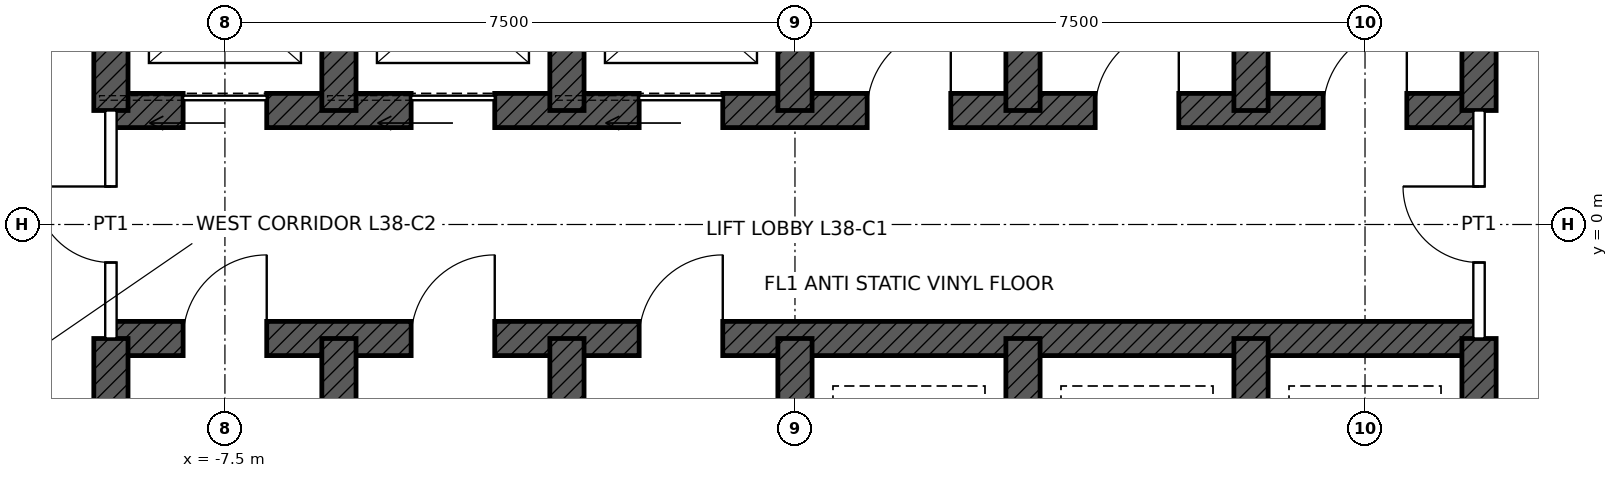
"""IFC4 building model, lengths in metres.
Left out: names, types, materials, properties, quantities, classifications, styles, units other than length and angle.
Written with IfcOpenShell. Run it as: python <this file> out.ifc"""

import sys

from ifc_helpers import new_model, si_unit, direction, frame, frame_2d, origin, place, context, subcontext, project, spatial, rectangle, extrude, element, fill, save


model = new_model("IFC4")
c1 = context("Model", 3, precision=1e-05, world=origin(), true_north=direction((0.0, 1.0)))
c2 = subcontext(c1, "Body", "Model", "MODEL_VIEW")
j1 = project(units=[si_unit("LENGTHUNIT", "METRE"), si_unit("PLANEANGLEUNIT", "RADIAN")], contexts=[c1])
p1 = place(None, origin())
s1 = spatial("IfcSite", under=j1, at=p1, CompositionType="ELEMENT")
p2 = place(p1, origin())
s2 = spatial("IfcBuilding", under=s1, at=p2, CompositionType="ELEMENT")
p3 = place(p2, frame((0.0, 0.0, 185.9)))
s3 = spatial("IfcBuildingStorey", under=s2, at=p3, CompositionType="ELEMENT", Elevation=185.9)
p4 = place(p3, frame((-9.0, 1.5, 0.0), z_axis=(0.0, 0.0, 1.0), x_axis=(1.0, 0.0, 0.0)))
e1 = element("IfcWall", 1, at=p4, inside=s3, PredefinedType="SHEAR", context=c2, shape_type="SweptSolid", body=[
    extrude(rectangle(XDim=18.0, YDim=0.45, at=frame_2d((9.0, 0.0))), origin(), (0.0, 0.0, 1.0), 4.0),
])
p5 = place(p4, frame((0.95, 0.0, 0.0)))
e2 = element("IfcOpeningElement", 2, at=p5, cuts=e1, PredefinedType="OPENING", context=c2, shape_type="SweptSolid", body=[
    extrude(rectangle(XDim=1.1, YDim=2.1, at=frame_2d((0.55, 1.05))), frame((0.0, 0.235, 0.0), z_axis=(0.0, -1.0, 0.0), x_axis=(1.0, 0.0, 0.0)), (0.0, 0.0, 1.0), 0.47),
])
p6 = place(p4, frame((3.95, 0.0, 0.0)))
e3 = element("IfcOpeningElement", 3, at=p6, cuts=e1, PredefinedType="OPENING", context=c2, shape_type="SweptSolid", body=[
    extrude(rectangle(XDim=1.1, YDim=2.1, at=frame_2d((0.55, 1.05))), frame((0.0, 0.235, 0.0), z_axis=(0.0, -1.0, 0.0), x_axis=(1.0, 0.0, 0.0)), (0.0, 0.0, 1.0), 0.47),
])
p7 = place(p4, frame((6.95, 0.0, 0.0)))
e4 = element("IfcOpeningElement", 4, at=p7, cuts=e1, PredefinedType="OPENING", context=c2, shape_type="SweptSolid", body=[
    extrude(rectangle(XDim=1.1, YDim=2.1, at=frame_2d((0.55, 1.05))), frame((0.0, 0.235, 0.0), z_axis=(0.0, -1.0, 0.0), x_axis=(1.0, 0.0, 0.0)), (0.0, 0.0, 1.0), 0.47),
])
p8 = place(p4, frame((9.95, 0.0, 0.0)))
e5 = element("IfcOpeningElement", 5, at=p8, cuts=e1, PredefinedType="OPENING", context=c2, shape_type="SweptSolid", body=[
    extrude(rectangle(XDim=1.1, YDim=2.1, at=frame_2d((0.55, 1.05))), frame((0.0, 0.235, 0.0), z_axis=(0.0, -1.0, 0.0), x_axis=(1.0, 0.0, 0.0)), (0.0, 0.0, 1.0), 0.47),
])
p9 = place(p4, frame((12.95, 0.0, 0.0)))
e6 = element("IfcOpeningElement", 6, at=p9, cuts=e1, PredefinedType="OPENING", context=c2, shape_type="SweptSolid", body=[
    extrude(rectangle(XDim=1.1, YDim=2.1, at=frame_2d((0.55, 1.05))), frame((0.0, 0.235, 0.0), z_axis=(0.0, -1.0, 0.0), x_axis=(1.0, 0.0, 0.0)), (0.0, 0.0, 1.0), 0.47),
])
p10 = place(p4, frame((15.95, 0.0, 0.0)))
e7 = element("IfcOpeningElement", 7, at=p10, cuts=e1, PredefinedType="OPENING", context=c2, shape_type="SweptSolid", body=[
    extrude(rectangle(XDim=1.1, YDim=2.1, at=frame_2d((0.55, 1.05))), frame((0.0, 0.235, 0.0), z_axis=(0.0, -1.0, 0.0), x_axis=(1.0, 0.0, 0.0)), (0.0, 0.0, 1.0), 0.47),
])
p11 = place(p3, frame((-9.0, -1.5, 0.0), z_axis=(0.0, 0.0, 1.0), x_axis=(1.0, 0.0, 0.0)))
e8 = element("IfcWall", 8, at=p11, inside=s3, PredefinedType="SHEAR", context=c2, shape_type="SweptSolid", body=[
    extrude(rectangle(XDim=18.0, YDim=0.45, at=frame_2d((9.0, 0.0))), origin(), (0.0, 0.0, 1.0), 4.0),
])
p12 = place(p11, frame((0.95, 0.0, 0.0)))
e9 = element("IfcOpeningElement", 9, at=p12, cuts=e8, PredefinedType="OPENING", context=c2, shape_type="SweptSolid", body=[
    extrude(rectangle(XDim=1.1, YDim=2.1, at=frame_2d((0.55, 1.05))), frame((0.0, 0.235, 0.0), z_axis=(0.0, -1.0, 0.0), x_axis=(1.0, 0.0, 0.0)), (0.0, 0.0, 1.0), 0.47),
])
p13 = place(p11, frame((3.95, 0.0, 0.0)))
e10 = element("IfcOpeningElement", 10, at=p13, cuts=e8, PredefinedType="OPENING", context=c2, shape_type="SweptSolid", body=[
    extrude(rectangle(XDim=1.1, YDim=2.1, at=frame_2d((0.55, 1.05))), frame((0.0, 0.235, 0.0), z_axis=(0.0, -1.0, 0.0), x_axis=(1.0, 0.0, 0.0)), (0.0, 0.0, 1.0), 0.47),
])
p14 = place(p11, frame((6.95, 0.0, 0.0)))
e11 = element("IfcOpeningElement", 11, at=p14, cuts=e8, PredefinedType="OPENING", context=c2, shape_type="SweptSolid", body=[
    extrude(rectangle(XDim=1.1, YDim=2.1, at=frame_2d((0.55, 1.05))), frame((0.0, 0.235, 0.0), z_axis=(0.0, -1.0, 0.0), x_axis=(1.0, 0.0, 0.0)), (0.0, 0.0, 1.0), 0.47),
])
for number, where, z_axis, x_axis in (
    (12, (-9.0, 1.5, 0.0), (0.0, 0.0, 1.0), (0.0, 1.0, 0.0)),
    (13, (9.0, 1.5, 0.0), (0.0, 0.0, 1.0), (0.0, 1.0, 0.0)),
    (14, (-9.0, -4.5, 0.0), (0.0, 0.0, 1.0), (0.0, 1.0, 0.0)),
    (15, (9.0, -4.5, 0.0), (0.0, 0.0, 1.0), (0.0, 1.0, 0.0)),
    (16, (-6.0, 1.5, 0.0), (0.0, 0.0, 1.0), (0.0, 1.0, 0.0)),
    (17, (-3.0, 1.5, 0.0), (0.0, 0.0, 1.0), (0.0, 1.0, 0.0)),
    (18, (0.0, 1.5, 0.0), (0.0, 0.0, 1.0), (0.0, 1.0, 0.0)),
    (19, (3.0, 1.5, 0.0), (0.0, 0.0, 1.0), (0.0, 1.0, 0.0)),
    (20, (6.0, 1.5, 0.0), (0.0, 0.0, 1.0), (0.0, 1.0, 0.0)),
    (21, (-6.0, -4.5, 0.0), (0.0, 0.0, 1.0), (0.0, 1.0, 0.0)),
    (22, (-3.0, -4.5, 0.0), (0.0, 0.0, 1.0), (0.0, 1.0, 0.0)),
    (23, (0.0, -4.5, 0.0), (0.0, 0.0, 1.0), (0.0, 1.0, 0.0)),
    (24, (3.0, -4.5, 0.0), (0.0, 0.0, 1.0), (0.0, 1.0, 0.0)),
    (25, (6.0, -4.5, 0.0), (0.0, 0.0, 1.0), (0.0, 1.0, 0.0)),
):
    element("IfcWall", number, at=place(p3, frame(where, z_axis=z_axis, x_axis=x_axis)), inside=s3, PredefinedType="SHEAR", context=c2, shape_type="SweptSolid", body=[
        extrude(rectangle(XDim=3.0, YDim=0.45, at=frame_2d((1.5, 0.0))), origin(), (0.0, 0.0, 1.0), 4.0),
    ])
p15 = place(p3, frame((-9.0, -1.5, 0.0), z_axis=(0.0, 0.0, 1.0), x_axis=(0.0, 1.0, 0.0)))
e26 = element("IfcWall", 26, at=p15, inside=s3, PredefinedType="PARTITIONING", context=c2, shape_type="SweptSolid", body=[
    extrude(rectangle(XDim=3.0, YDim=0.15, at=frame_2d((1.5, 0.0))), origin(), (0.0, 0.0, 1.0), 3.75),
])
p16 = place(p15, frame((1.0, 0.0, 0.0)))
e27 = element("IfcOpeningElement", 27, at=p16, cuts=e26, PredefinedType="OPENING", context=c2, shape_type="SweptSolid", body=[
    extrude(rectangle(XDim=1.0, YDim=2.4, at=frame_2d((0.5, 1.2))), frame((0.0, 0.085, 0.0), z_axis=(0.0, -1.0, 0.0), x_axis=(1.0, 0.0, 0.0)), (0.0, 0.0, 1.0), 0.17),
])
p17 = place(p3, frame((9.0, -1.5, 0.0), z_axis=(0.0, 0.0, 1.0), x_axis=(0.0, 1.0, 0.0)))
e28 = element("IfcWall", 28, at=p17, inside=s3, PredefinedType="PARTITIONING", context=c2, shape_type="SweptSolid", body=[
    extrude(rectangle(XDim=3.0, YDim=0.15, at=frame_2d((1.5, 0.0))), origin(), (0.0, 0.0, 1.0), 3.75),
])
p18 = place(p17, frame((1.0, 0.0, 0.0)))
e29 = element("IfcOpeningElement", 29, at=p18, cuts=e28, PredefinedType="OPENING", context=c2, shape_type="SweptSolid", body=[
    extrude(rectangle(XDim=1.0, YDim=2.4, at=frame_2d((0.5, 1.2))), frame((0.0, 0.085, 0.0), z_axis=(0.0, -1.0, 0.0), x_axis=(1.0, 0.0, 0.0)), (0.0, 0.0, 1.0), 0.17),
])
p19 = place(p5, origin())
e30 = element("IfcDoor", 30, at=p19, inside=s3, OperationType="SLIDING_TO_LEFT", PredefinedType="DOOR", context=c2, shape_type="SweptSolid", body=[
    extrude(rectangle(XDim=1.1, YDim=2.1, at=frame_2d((0.55, 1.05))), frame((0.0, 0.025, 0.0), z_axis=(0.0, -1.0, 0.0), x_axis=(1.0, 0.0, 0.0)), (0.0, 0.0, 1.0), 0.05),
])
fill(e2, e30)
p20 = place(p6, origin())
e31 = element("IfcDoor", 31, at=p20, inside=s3, OperationType="SLIDING_TO_LEFT", PredefinedType="DOOR", context=c2, shape_type="SweptSolid", body=[
    extrude(rectangle(XDim=1.1, YDim=2.1, at=frame_2d((0.55, 1.05))), frame((0.0, 0.025, 0.0), z_axis=(0.0, -1.0, 0.0), x_axis=(1.0, 0.0, 0.0)), (0.0, 0.0, 1.0), 0.05),
])
fill(e3, e31)
p21 = place(p7, origin())
e32 = element("IfcDoor", 32, at=p21, inside=s3, OperationType="SLIDING_TO_LEFT", PredefinedType="DOOR", context=c2, shape_type="SweptSolid", body=[
    extrude(rectangle(XDim=1.1, YDim=2.1, at=frame_2d((0.55, 1.05))), frame((0.0, 0.025, 0.0), z_axis=(0.0, -1.0, 0.0), x_axis=(1.0, 0.0, 0.0)), (0.0, 0.0, 1.0), 0.05),
])
fill(e4, e32)
p22 = place(p16, origin())
e33 = element("IfcDoor", 33, at=p22, inside=s3, OperationType="SINGLE_SWING_RIGHT", PredefinedType="DOOR", context=c2, shape_type="SweptSolid", body=[
    extrude(rectangle(XDim=1.0, YDim=2.4, at=frame_2d((0.5, 1.2))), frame((0.0, 0.025, 0.0), z_axis=(0.0, -1.0, 0.0), x_axis=(1.0, 0.0, 0.0)), (0.0, 0.0, 1.0), 0.05),
])
fill(e27, e33)
p23 = place(p18, origin())
e34 = element("IfcDoor", 34, at=p23, inside=s3, OperationType="SINGLE_SWING_RIGHT", PredefinedType="DOOR", context=c2, shape_type="SweptSolid", body=[
    extrude(rectangle(XDim=1.0, YDim=2.4, at=frame_2d((0.5, 1.2))), frame((0.0, 0.025, 0.0), z_axis=(0.0, -1.0, 0.0), x_axis=(1.0, 0.0, 0.0)), (0.0, 0.0, 1.0), 0.05),
])
fill(e29, e34)
p24 = place(p8, origin())
e35 = element("IfcDoor", 35, at=p24, inside=s3, OperationType="SINGLE_SWING_RIGHT", PredefinedType="DOOR", context=c2, shape_type="SweptSolid", body=[
    extrude(rectangle(XDim=1.1, YDim=2.1, at=frame_2d((0.55, 1.05))), frame((0.0, 0.025, 0.0), z_axis=(0.0, -1.0, 0.0), x_axis=(1.0, 0.0, 0.0)), (0.0, 0.0, 1.0), 0.05),
])
fill(e5, e35)
p25 = place(p9, origin())
e36 = element("IfcDoor", 36, at=p25, inside=s3, OperationType="SINGLE_SWING_RIGHT", PredefinedType="DOOR", context=c2, shape_type="SweptSolid", body=[
    extrude(rectangle(XDim=1.1, YDim=2.1, at=frame_2d((0.55, 1.05))), frame((0.0, 0.025, 0.0), z_axis=(0.0, -1.0, 0.0), x_axis=(1.0, 0.0, 0.0)), (0.0, 0.0, 1.0), 0.05),
])
fill(e6, e36)
p26 = place(p10, origin())
e37 = element("IfcDoor", 37, at=p26, inside=s3, OperationType="SINGLE_SWING_RIGHT", PredefinedType="DOOR", context=c2, shape_type="SweptSolid", body=[
    extrude(rectangle(XDim=1.1, YDim=2.1, at=frame_2d((0.55, 1.05))), frame((0.0, 0.025, 0.0), z_axis=(0.0, -1.0, 0.0), x_axis=(1.0, 0.0, 0.0)), (0.0, 0.0, 1.0), 0.05),
])
fill(e7, e37)
p27 = place(p12, origin())
e38 = element("IfcDoor", 38, at=p27, inside=s3, OperationType="SINGLE_SWING_RIGHT", PredefinedType="DOOR", context=c2, shape_type="SweptSolid", body=[
    extrude(rectangle(XDim=1.1, YDim=2.1, at=frame_2d((0.55, 1.05))), frame((0.0, 0.025, 0.0), z_axis=(0.0, -1.0, 0.0), x_axis=(1.0, 0.0, 0.0)), (0.0, 0.0, 1.0), 0.05),
])
fill(e9, e38)
p28 = place(p13, origin())
e39 = element("IfcDoor", 39, at=p28, inside=s3, OperationType="SINGLE_SWING_RIGHT", PredefinedType="DOOR", context=c2, shape_type="SweptSolid", body=[
    extrude(rectangle(XDim=1.1, YDim=2.1, at=frame_2d((0.55, 1.05))), frame((0.0, 0.025, 0.0), z_axis=(0.0, -1.0, 0.0), x_axis=(1.0, 0.0, 0.0)), (0.0, 0.0, 1.0), 0.05),
])
fill(e10, e39)
p29 = place(p14, origin())
e40 = element("IfcDoor", 40, at=p29, inside=s3, OperationType="SINGLE_SWING_RIGHT", PredefinedType="DOOR", context=c2, shape_type="SweptSolid", body=[
    extrude(rectangle(XDim=1.1, YDim=2.1, at=frame_2d((0.55, 1.05))), frame((0.0, 0.025, 0.0), z_axis=(0.0, -1.0, 0.0), x_axis=(1.0, 0.0, 0.0)), (0.0, 0.0, 1.0), 0.05),
])
fill(e11, e40)
save(model, sys.argv[1])
